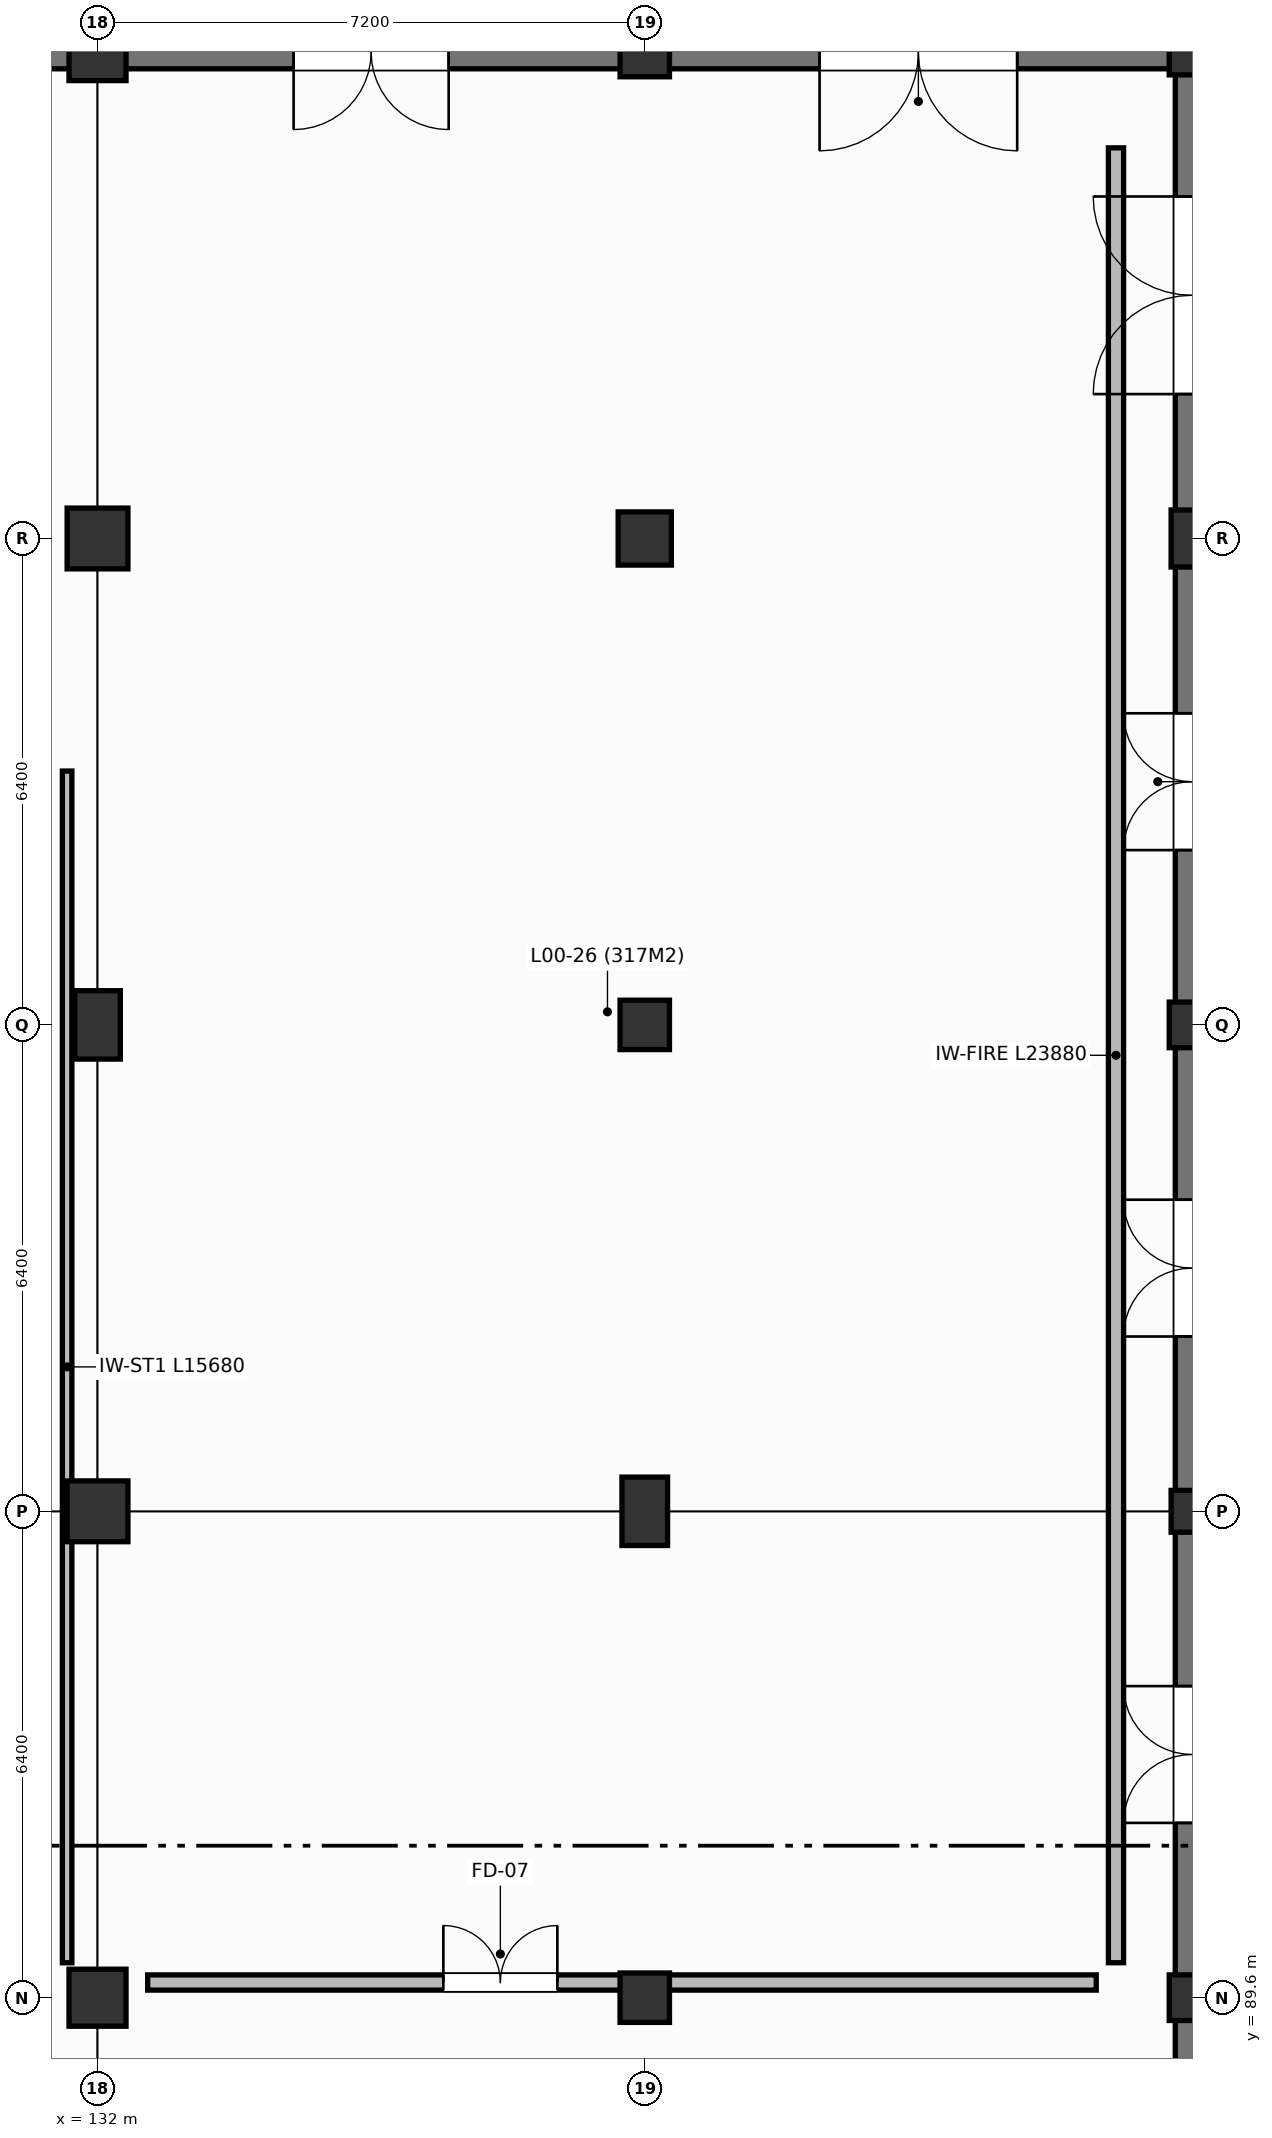
"""IFC4 building model, lengths in metres.
Left out: names, types, materials, properties, quantities, classifications, styles, units other than length and angle.
Written with IfcOpenShell. Run it as: python <this file> out.ifc"""

import sys

from ifc_helpers import new_model, si_unit, direction, frame, frame_2d, origin, origin_2d, place, context, subcontext, project, spatial, rectangle, extrude, element, fill, save


model = new_model("IFC4")
c1 = context("Model", 3, precision=1e-05, world=origin(), true_north=direction((0.0, 1.0)))
c2 = subcontext(c1, "Body", "Model", "MODEL_VIEW")
j1 = project(units=[si_unit("LENGTHUNIT", "METRE"), si_unit("PLANEANGLEUNIT", "RADIAN")], contexts=[c1])
p1 = place(None, origin())
s1 = spatial("IfcSite", under=j1, at=p1, CompositionType="ELEMENT")
p2 = place(p1, origin())
s2 = spatial("IfcBuilding", under=s1, at=p2, CompositionType="ELEMENT")
p3 = place(p2, origin())
s3 = spatial("IfcBuildingStorey", under=s2, at=p3, CompositionType="ELEMENT", Elevation=0.0)
p4 = place(p3, frame((132.0, 89.6, 0.0), z_axis=(0.0, 0.0, 1.0), x_axis=(1.0, 0.0, 0.0)))
e1 = element("IfcColumn", 1, at=p4, inside=s3, PredefinedType="COLUMN", context=c2, shape_type="SweptSolid", body=[
    extrude(rectangle(XDim=0.75, YDim=0.75, at=origin_2d()), origin(), (0.0, 0.0, 1.0), 4.8),
])
p5 = place(p3, frame((132.0, 96.0, 0.0), z_axis=(0.0, 0.0, 1.0), x_axis=(1.0, 0.0, 0.0)))
e2 = element("IfcColumn", 2, at=p5, inside=s3, PredefinedType="COLUMN", context=c2, shape_type="SweptSolid", body=[
    extrude(rectangle(XDim=0.8, YDim=0.8, at=origin_2d()), origin(), (0.0, 0.0, 1.0), 4.8),
])
p6 = place(p3, frame((132.0, 102.4, 0.0), z_axis=(0.0, 0.0, 1.0), x_axis=(1.0, 0.0, 0.0)))
e3 = element("IfcColumn", 3, at=p6, inside=s3, PredefinedType="COLUMN", context=c2, shape_type="SweptSolid", body=[
    extrude(rectangle(XDim=0.6, YDim=0.9, at=origin_2d()), origin(), (0.0, 0.0, 1.0), 4.8),
])
p7 = place(p3, frame((132.0, 108.8, 0.0), z_axis=(0.0, 0.0, 1.0), x_axis=(1.0, 0.0, 0.0)))
e4 = element("IfcColumn", 4, at=p7, inside=s3, PredefinedType="COLUMN", context=c2, shape_type="SweptSolid", body=[
    extrude(rectangle(XDim=0.8, YDim=0.8, at=origin_2d()), origin(), (0.0, 0.0, 1.0), 4.8),
])
p8 = place(p3, frame((132.0, 115.2, 0.0), z_axis=(0.0, 0.0, 1.0), x_axis=(1.0, 0.0, 0.0)))
e5 = element("IfcColumn", 5, at=p8, inside=s3, PredefinedType="COLUMN", context=c2, shape_type="SweptSolid", body=[
    extrude(rectangle(XDim=0.75, YDim=0.75, at=origin_2d()), origin(), (0.0, 0.0, 1.0), 4.8),
])
p9 = place(p3, frame((139.2, 89.6, 0.0), z_axis=(0.0, 0.0, 1.0), x_axis=(1.0, 0.0, 0.0)))
e6 = element("IfcColumn", 6, at=p9, inside=s3, PredefinedType="COLUMN", context=c2, shape_type="SweptSolid", body=[
    extrude(rectangle(XDim=0.65, YDim=0.65, at=origin_2d()), origin(), (0.0, 0.0, 1.0), 4.8),
])
p10 = place(p3, frame((139.2, 96.0, 0.0), z_axis=(0.0, 0.0, 1.0), x_axis=(1.0, 0.0, 0.0)))
e7 = element("IfcColumn", 7, at=p10, inside=s3, PredefinedType="COLUMN", context=c2, shape_type="SweptSolid", body=[
    extrude(rectangle(XDim=0.6, YDim=0.9, at=origin_2d()), origin(), (0.0, 0.0, 1.0), 4.8),
])
p11 = place(p3, frame((139.2, 102.4, 0.0), z_axis=(0.0, 0.0, 1.0), x_axis=(1.0, 0.0, 0.0)))
e8 = element("IfcColumn", 8, at=p11, inside=s3, PredefinedType="COLUMN", context=c2, shape_type="SweptSolid", body=[
    extrude(rectangle(XDim=0.65, YDim=0.65, at=origin_2d()), origin(), (0.0, 0.0, 1.0), 4.8),
])
p12 = place(p3, frame((139.2, 108.8, 0.0), z_axis=(0.0, 0.0, 1.0), x_axis=(1.0, 0.0, 0.0)))
e9 = element("IfcColumn", 9, at=p12, inside=s3, PredefinedType="COLUMN", context=c2, shape_type="SweptSolid", body=[
    extrude(rectangle(XDim=0.7, YDim=0.7, at=origin_2d()), origin(), (0.0, 0.0, 1.0), 4.8),
])
p13 = place(p3, frame((139.2, 115.2, 0.0), z_axis=(0.0, 0.0, 1.0), x_axis=(1.0, 0.0, 0.0)))
e10 = element("IfcColumn", 10, at=p13, inside=s3, PredefinedType="COLUMN", context=c2, shape_type="SweptSolid", body=[
    extrude(rectangle(XDim=0.65, YDim=0.65, at=origin_2d()), origin(), (0.0, 0.0, 1.0), 4.8),
])
p14 = place(p3, frame((146.4, 89.6, 0.0), z_axis=(0.0, 0.0, 1.0), x_axis=(1.0, 0.0, 0.0)))
e11 = element("IfcColumn", 11, at=p14, inside=s3, PredefinedType="COLUMN", context=c2, shape_type="SweptSolid", body=[
    extrude(rectangle(XDim=0.6, YDim=0.6, at=origin_2d()), origin(), (0.0, 0.0, 1.0), 4.8),
])
p15 = place(p3, frame((146.4, 96.0, 0.0), z_axis=(0.0, 0.0, 1.0), x_axis=(1.0, 0.0, 0.0)))
e12 = element("IfcColumn", 12, at=p15, inside=s3, PredefinedType="COLUMN", context=c2, shape_type="SweptSolid", body=[
    extrude(rectangle(XDim=0.55, YDim=0.55, at=origin_2d()), origin(), (0.0, 0.0, 1.0), 4.8),
])
p16 = place(p3, frame((146.4, 102.4, 0.0), z_axis=(0.0, 0.0, 1.0), x_axis=(1.0, 0.0, 0.0)))
e13 = element("IfcColumn", 13, at=p16, inside=s3, PredefinedType="COLUMN", context=c2, shape_type="SweptSolid", body=[
    extrude(rectangle(XDim=0.6, YDim=0.6, at=origin_2d()), origin(), (0.0, 0.0, 1.0), 4.8),
])
p17 = place(p3, frame((146.4, 108.8, 0.0), z_axis=(0.0, 0.0, 1.0), x_axis=(1.0, 0.0, 0.0)))
e14 = element("IfcColumn", 14, at=p17, inside=s3, PredefinedType="COLUMN", context=c2, shape_type="SweptSolid", body=[
    extrude(rectangle(XDim=0.55, YDim=0.75, at=origin_2d()), origin(), (0.0, 0.0, 1.0), 4.8),
])
p18 = place(p3, frame((146.4, 115.2, 0.0), z_axis=(0.0, 0.0, 1.0), x_axis=(1.0, 0.0, 0.0)))
e15 = element("IfcColumn", 15, at=p18, inside=s3, PredefinedType="COLUMN", context=c2, shape_type="SweptSolid", body=[
    extrude(rectangle(XDim=0.6, YDim=0.6, at=origin_2d()), origin(), (0.0, 0.0, 1.0), 4.8),
])
p19 = place(p3, frame((124.8, 115.2, 0.0), z_axis=(0.0, 0.0, 1.0), x_axis=(1.0, 0.0, 0.0)))
e16 = element("IfcWall", 16, at=p19, inside=s3, PredefinedType="STANDARD", context=c2, shape_type="SweptSolid", body=[
    extrude(rectangle(XDim=7.2, YDim=0.44, at=frame_2d((3.6, 0.0))), origin(), (0.0, 0.0, 1.0), 4.44),
])
p20 = place(p19, frame((2.58, 0.0, 0.0)))
e17 = element("IfcOpeningElement", 17, at=p20, cuts=e16, PredefinedType="OPENING", context=c2, shape_type="SweptSolid", body=[
    extrude(rectangle(XDim=2.04, YDim=2.4, at=frame_2d((1.02, 1.2))), frame((0.0, 0.23, 0.0), z_axis=(0.0, -1.0, 0.0), x_axis=(1.0, 0.0, 0.0)), (0.0, 0.0, 1.0), 0.46),
])
p21 = place(p3, frame((132.0, 115.2, 0.0), z_axis=(0.0, 0.0, 1.0), x_axis=(1.0, 0.0, 0.0)))
e18 = element("IfcWall", 18, at=p21, inside=s3, PredefinedType="STANDARD", context=c2, shape_type="SweptSolid", body=[
    extrude(rectangle(XDim=7.2, YDim=0.44, at=frame_2d((3.6, 0.0))), origin(), (0.0, 0.0, 1.0), 4.44),
])
p22 = place(p21, frame((2.58, 0.0, 0.0)))
e19 = element("IfcOpeningElement", 19, at=p22, cuts=e18, PredefinedType="OPENING", context=c2, shape_type="SweptSolid", body=[
    extrude(rectangle(XDim=2.04, YDim=2.4, at=frame_2d((1.02, 1.2))), frame((0.0, 0.23, 0.0), z_axis=(0.0, -1.0, 0.0), x_axis=(1.0, 0.0, 0.0)), (0.0, 0.0, 1.0), 0.46),
])
p23 = place(p3, frame((139.2, 115.2, 0.0), z_axis=(0.0, 0.0, 1.0), x_axis=(1.0, 0.0, 0.0)))
e20 = element("IfcWall", 20, at=p23, inside=s3, PredefinedType="STANDARD", context=c2, shape_type="SweptSolid", body=[
    extrude(rectangle(XDim=7.2, YDim=0.44, at=frame_2d((3.6, 0.0))), origin(), (0.0, 0.0, 1.0), 4.44),
])
p24 = place(p23, frame((2.3, 0.0, 0.0)))
e21 = element("IfcOpeningElement", 21, at=p24, cuts=e20, PredefinedType="OPENING", context=c2, shape_type="SweptSolid", body=[
    extrude(rectangle(XDim=2.6, YDim=2.2, at=frame_2d((1.3, 1.1))), frame((0.0, 0.23, 0.0), z_axis=(0.0, -1.0, 0.0), x_axis=(1.0, 0.0, 0.0)), (0.0, 0.0, 1.0), 0.46),
])
p25 = place(p3, frame((146.4, 115.2, 0.0), z_axis=(0.0, 0.0, 1.0), x_axis=(0.0, -1.0, 0.0)))
e22 = element("IfcWall", 22, at=p25, inside=s3, PredefinedType="STANDARD", context=c2, shape_type="SweptSolid", body=[
    extrude(rectangle(XDim=6.4, YDim=0.44, at=frame_2d((3.2, 0.0))), origin(), (0.0, 0.0, 1.0), 4.44),
])
p26 = place(p25, frame((1.9, 0.0, 0.0)))
e23 = element("IfcOpeningElement", 23, at=p26, cuts=e22, PredefinedType="OPENING", context=c2, shape_type="SweptSolid", body=[
    extrude(rectangle(XDim=2.6, YDim=2.2, at=frame_2d((1.3, 1.1))), frame((0.0, 0.23, 0.0), z_axis=(0.0, -1.0, 0.0), x_axis=(1.0, 0.0, 0.0)), (0.0, 0.0, 1.0), 0.46),
])
p27 = place(p3, frame((146.4, 108.8, 0.0), z_axis=(0.0, 0.0, 1.0), x_axis=(0.0, -1.0, 0.0)))
e24 = element("IfcWall", 24, at=p27, inside=s3, PredefinedType="STANDARD", context=c2, shape_type="SweptSolid", body=[
    extrude(rectangle(XDim=6.4, YDim=0.44, at=frame_2d((3.2, 0.0))), origin(), (0.0, 0.0, 1.0), 4.44),
])
p28 = place(p27, frame((2.3, 0.0, 0.0)))
e25 = element("IfcOpeningElement", 25, at=p28, cuts=e24, PredefinedType="OPENING", context=c2, shape_type="SweptSolid", body=[
    extrude(rectangle(XDim=1.8, YDim=2.2, at=frame_2d((0.9, 1.1))), frame((0.0, 0.23, 0.0), z_axis=(0.0, -1.0, 0.0), x_axis=(1.0, 0.0, 0.0)), (0.0, 0.0, 1.0), 0.46),
])
p29 = place(p3, frame((146.4, 102.4, 0.0), z_axis=(0.0, 0.0, 1.0), x_axis=(0.0, -1.0, 0.0)))
e26 = element("IfcWall", 26, at=p29, inside=s3, PredefinedType="STANDARD", context=c2, shape_type="SweptSolid", body=[
    extrude(rectangle(XDim=6.4, YDim=0.44, at=frame_2d((3.2, 0.0))), origin(), (0.0, 0.0, 1.0), 4.44),
])
p30 = place(p29, frame((2.3, 0.0, 0.0)))
e27 = element("IfcOpeningElement", 27, at=p30, cuts=e26, PredefinedType="OPENING", context=c2, shape_type="SweptSolid", body=[
    extrude(rectangle(XDim=1.8, YDim=2.2, at=frame_2d((0.9, 1.1))), frame((0.0, 0.23, 0.0), z_axis=(0.0, -1.0, 0.0), x_axis=(1.0, 0.0, 0.0)), (0.0, 0.0, 1.0), 0.46),
])
p31 = place(p3, frame((146.4, 96.0, 0.0), z_axis=(0.0, 0.0, 1.0), x_axis=(0.0, -1.0, 0.0)))
e28 = element("IfcWall", 28, at=p31, inside=s3, PredefinedType="STANDARD", context=c2, shape_type="SweptSolid", body=[
    extrude(rectangle(XDim=6.4, YDim=0.44, at=frame_2d((3.2, 0.0))), origin(), (0.0, 0.0, 1.0), 4.44),
])
p32 = place(p31, frame((2.3, 0.0, 0.0)))
e29 = element("IfcOpeningElement", 29, at=p32, cuts=e28, PredefinedType="OPENING", context=c2, shape_type="SweptSolid", body=[
    extrude(rectangle(XDim=1.8, YDim=2.2, at=frame_2d((0.9, 1.1))), frame((0.0, 0.23, 0.0), z_axis=(0.0, -1.0, 0.0), x_axis=(1.0, 0.0, 0.0)), (0.0, 0.0, 1.0), 0.46),
])
p33 = place(p3, frame((146.4, 89.6, 0.0), z_axis=(0.0, 0.0, 1.0), x_axis=(0.0, -1.0, 0.0)))
e30 = element("IfcWall", 30, at=p33, inside=s3, PredefinedType="STANDARD", context=c2, shape_type="SweptSolid", body=[
    extrude(rectangle(XDim=6.4, YDim=0.44, at=frame_2d((3.2, 0.0))), origin(), (0.0, 0.0, 1.0), 4.44),
])
p34 = place(p33, frame((2.3, 0.0, 0.8)))
e31 = element("IfcOpeningElement", 31, at=p34, cuts=e30, PredefinedType="OPENING", context=c2, shape_type="SweptSolid", body=[
    extrude(rectangle(XDim=1.8, YDim=2.05, at=frame_2d((0.9, 1.025))), frame((0.0, 0.23, 0.0), z_axis=(0.0, -1.0, 0.0), x_axis=(1.0, 0.0, 0.0)), (0.0, 0.0, 1.0), 0.46),
])
p35 = place(p3, frame((131.6, 90.06, 0.0), z_axis=(0.0, 0.0, 1.0), x_axis=(0.0, 1.0, 0.0)))
e32 = element("IfcWall", 32, at=p35, inside=s3, PredefinedType="PARTITIONING", context=c2, shape_type="SweptSolid", body=[
    extrude(rectangle(XDim=15.68, YDim=0.125, at=frame_2d((7.84, 0.0))), origin(), (0.0, 0.0, 1.0), 3.215),
])
p36 = place(p3, frame((132.66, 89.8, 0.0), z_axis=(0.0, 0.0, 1.0), x_axis=(1.0, 0.0, 0.0)))
e33 = element("IfcWall", 33, at=p36, inside=s3, PredefinedType="PARTITIONING", context=c2, shape_type="SweptSolid", body=[
    extrude(rectangle(XDim=12.48, YDim=0.2, at=frame_2d((6.24, 0.0))), origin(), (0.0, 0.0, 1.0), 3.665),
])
p37 = place(p36, frame((3.89, 0.0, 0.0)))
e34 = element("IfcOpeningElement", 34, at=p37, cuts=e33, PredefinedType="OPENING", context=c2, shape_type="SweptSolid", body=[
    extrude(rectangle(XDim=1.5, YDim=2.2, at=frame_2d((0.75, 1.1))), frame((0.0, 0.11, 0.0), z_axis=(0.0, -1.0, 0.0), x_axis=(1.0, 0.0, 0.0)), (0.0, 0.0, 1.0), 0.22),
])
p38 = place(p3, frame((145.4, 90.06, 0.0), z_axis=(0.0, 0.0, 1.0), x_axis=(0.0, 1.0, 0.0)))
e35 = element("IfcWall", 35, at=p38, inside=s3, PredefinedType="PARTITIONING", context=c2, shape_type="SweptSolid", body=[
    extrude(rectangle(XDim=23.88, YDim=0.2, at=frame_2d((11.94, 0.0))), origin(), (0.0, 0.0, 1.0), 4.44),
])
p39 = place(p22, frame((2.04, 0.0, 0.0), z_axis=(0.0, 0.0, 1.0), x_axis=(-1.0, 0.0, 0.0)))
e36 = element("IfcDoor", 36, at=p39, inside=s3, OperationType="DOUBLE_DOOR_SINGLE_SWING", PredefinedType="DOOR", context=c2, shape_type="SweptSolid", body=[
    extrude(rectangle(XDim=2.04, YDim=2.4, at=frame_2d((1.02, 1.2))), frame((0.0, 0.025, 0.0), z_axis=(0.0, -1.0, 0.0), x_axis=(1.0, 0.0, 0.0)), (0.0, 0.0, 1.0), 0.05),
])
fill(e19, e36)
p40 = place(p24, frame((2.6, 0.0, 0.0), z_axis=(0.0, 0.0, 1.0), x_axis=(-1.0, 0.0, 0.0)))
e37 = element("IfcDoor", 37, at=p40, inside=s3, OperationType="DOUBLE_DOOR_SINGLE_SWING", PredefinedType="GATE", context=c2, shape_type="SweptSolid", body=[
    extrude(rectangle(XDim=2.6, YDim=2.2, at=frame_2d((1.3, 1.1))), frame((0.0, 0.025, 0.0), z_axis=(0.0, -1.0, 0.0), x_axis=(1.0, 0.0, 0.0)), (0.0, 0.0, 1.0), 0.05),
])
fill(e21, e37)
p41 = place(p26, frame((2.6, 0.0, 0.0), z_axis=(0.0, 0.0, 1.0), x_axis=(-1.0, 0.0, 0.0)))
e38 = element("IfcDoor", 38, at=p41, inside=s3, OperationType="DOUBLE_DOOR_SINGLE_SWING", PredefinedType="GATE", context=c2, shape_type="SweptSolid", body=[
    extrude(rectangle(XDim=2.6, YDim=2.2, at=frame_2d((1.3, 1.1))), frame((0.0, 0.025, 0.0), z_axis=(0.0, -1.0, 0.0), x_axis=(1.0, 0.0, 0.0)), (0.0, 0.0, 1.0), 0.05),
])
fill(e23, e38)
p42 = place(p28, frame((1.8, 0.0, 0.0), z_axis=(0.0, 0.0, 1.0), x_axis=(-1.0, 0.0, 0.0)))
e39 = element("IfcDoor", 39, at=p42, inside=s3, OperationType="DOUBLE_DOOR_SINGLE_SWING", PredefinedType="GATE", context=c2, shape_type="SweptSolid", body=[
    extrude(rectangle(XDim=1.8, YDim=2.2, at=frame_2d((0.9, 1.1))), frame((0.0, 0.025, 0.0), z_axis=(0.0, -1.0, 0.0), x_axis=(1.0, 0.0, 0.0)), (0.0, 0.0, 1.0), 0.05),
])
fill(e25, e39)
p43 = place(p30, frame((1.8, 0.0, 0.0), z_axis=(0.0, 0.0, 1.0), x_axis=(-1.0, 0.0, 0.0)))
e40 = element("IfcDoor", 40, at=p43, inside=s3, OperationType="DOUBLE_DOOR_SINGLE_SWING", PredefinedType="GATE", context=c2, shape_type="SweptSolid", body=[
    extrude(rectangle(XDim=1.8, YDim=2.2, at=frame_2d((0.9, 1.1))), frame((0.0, 0.025, 0.0), z_axis=(0.0, -1.0, 0.0), x_axis=(1.0, 0.0, 0.0)), (0.0, 0.0, 1.0), 0.05),
])
fill(e27, e40)
p44 = place(p32, frame((1.8, 0.0, 0.0), z_axis=(0.0, 0.0, 1.0), x_axis=(-1.0, 0.0, 0.0)))
e41 = element("IfcDoor", 41, at=p44, inside=s3, OperationType="DOUBLE_DOOR_SINGLE_SWING", PredefinedType="GATE", context=c2, shape_type="SweptSolid", body=[
    extrude(rectangle(XDim=1.8, YDim=2.2, at=frame_2d((0.9, 1.1))), frame((0.0, 0.025, 0.0), z_axis=(0.0, -1.0, 0.0), x_axis=(1.0, 0.0, 0.0)), (0.0, 0.0, 1.0), 0.05),
])
fill(e29, e41)
p45 = place(p37, origin())
e42 = element("IfcDoor", 42, at=p45, inside=s3, OperationType="DOUBLE_DOOR_SINGLE_SWING", PredefinedType="DOOR", context=c2, shape_type="SweptSolid", body=[
    extrude(rectangle(XDim=1.5, YDim=2.2, at=frame_2d((0.75, 1.1))), frame((0.0, 0.025, 0.0), z_axis=(0.0, -1.0, 0.0), x_axis=(1.0, 0.0, 0.0)), (0.0, 0.0, 1.0), 0.05),
])
fill(e34, e42)
save(model, sys.argv[1])
